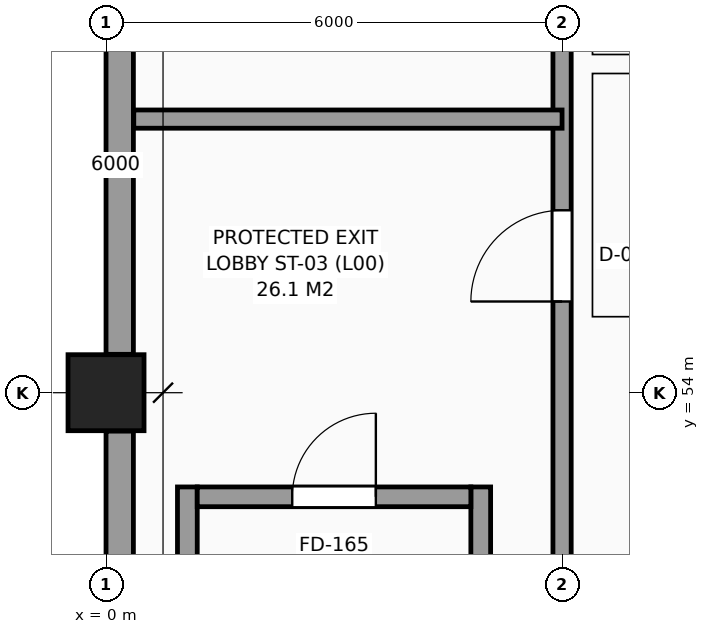
"""IFC4 building model, lengths in metres.
Left out: names, types, materials, properties, quantities, classifications, styles, units other than length and angle.
Written with IfcOpenShell. Run it as: python <this file> out.ifc"""

import sys

from ifc_helpers import new_model, si_unit, direction, frame, frame_2d, origin, origin_2d, place, context, subcontext, project, spatial, rectangle, extrude, element, fill, save


model = new_model("IFC4")
c1 = context("Model", 3, precision=1e-05, world=origin(), true_north=direction((0.0, 1.0)))
c2 = subcontext(c1, "Body", "Model", "MODEL_VIEW")
j1 = project(units=[si_unit("LENGTHUNIT", "METRE"), si_unit("PLANEANGLEUNIT", "RADIAN")], contexts=[c1])
p1 = place(None, origin())
s1 = spatial("IfcSite", under=j1, at=p1, CompositionType="ELEMENT")
p2 = place(p1, origin())
s2 = spatial("IfcBuilding", under=s1, at=p2, CompositionType="ELEMENT")
p3 = place(p2, origin())
s3 = spatial("IfcBuildingStorey", under=s2, at=p3, CompositionType="ELEMENT", Elevation=0.0)
p4 = place(p3, frame((0.0, 54.0, 0.0), z_axis=(0.0, 0.0, 1.0), x_axis=(1.0, 0.0, 0.0)))
e1 = element("IfcColumn", 1, at=p4, inside=s3, PredefinedType="COLUMN", context=c2, shape_type="SweptSolid", body=[
    extrude(rectangle(XDim=1.0, YDim=1.0, at=origin_2d()), origin(), (0.0, 0.0, 1.0), 6.0),
])
for number, where, z_axis, x_axis in (
    (2, (0.18, 59.295, 0.0), (0.0, 0.0, 1.0), (0.0, -1.0, 0.0)),
    (3, (0.18, 53.495, 0.0), (0.0, 0.0, 1.0), (0.0, -1.0, 0.0)),
):
    element("IfcWall", number, at=place(p3, frame(where, z_axis=z_axis, x_axis=x_axis)), inside=s3, PredefinedType="SOLIDWALL", context=c2, shape_type="SweptSolid", body=[
        extrude(rectangle(XDim=4.79, YDim=0.36, at=frame_2d((2.395, 0.0))), origin(), (0.0, 0.0, 1.0), 4.99),
    ])
for number, where, z_axis, x_axis in (
    (4, (1.07, 42.04, 0.0), (0.0, 0.0, 1.0), (0.0, 1.0, 0.0)),
    (5, (4.93, 42.04, 0.0), (0.0, 0.0, 1.0), (0.0, 1.0, 0.0)),
):
    element("IfcWall", number, at=place(p3, frame(where, z_axis=z_axis, x_axis=x_axis)), inside=s3, PredefinedType="SHEAR", context=c2, shape_type="SweptSolid", body=[
        extrude(rectangle(XDim=10.72, YDim=0.26, at=frame_2d((5.36, 0.0))), origin(), (0.0, 0.0, 1.0), 6.0),
    ])
p5 = place(p3, frame((1.2, 52.63, 0.0), z_axis=(0.0, 0.0, 1.0), x_axis=(1.0, 0.0, 0.0)))
e6 = element("IfcWall", 6, at=p5, inside=s3, PredefinedType="SHEAR", context=c2, shape_type="SweptSolid", body=[
    extrude(rectangle(XDim=3.6, YDim=0.26, at=frame_2d((1.8, 0.0))), origin(), (0.0, 0.0, 1.0), 6.0),
])
p6 = place(p5, frame((1.25, 0.0, 0.0)))
e7 = element("IfcOpeningElement", 7, at=p6, cuts=e6, PredefinedType="OPENING", context=c2, shape_type="SweptSolid", body=[
    extrude(rectangle(XDim=1.1, YDim=2.15, at=frame_2d((0.55, 1.075))), frame((0.0, 0.14, 0.0), z_axis=(0.0, -1.0, 0.0), x_axis=(1.0, 0.0, 0.0)), (0.0, 0.0, 1.0), 0.28),
])
p7 = place(p3, frame((6.0, 42.705, 0.0), z_axis=(0.0, 0.0, 1.0), x_axis=(0.0, 1.0, 0.0)))
e8 = element("IfcWall", 8, at=p7, inside=s3, PredefinedType="PARTITIONING", context=c2, shape_type="SweptSolid", body=[
    extrude(rectangle(XDim=40.79, YDim=0.24, at=frame_2d((20.395, 0.0))), origin(), (0.0, 0.0, 1.0), 5.74),
])
p8 = place(p7, frame((12.495, 0.0, 0.0)))
e9 = element("IfcOpeningElement", 9, at=p8, cuts=e8, PredefinedType="OPENING", context=c2, shape_type="SweptSolid", body=[
    extrude(rectangle(XDim=1.2, YDim=2.2, at=frame_2d((0.6, 1.1))), frame((0.0, 0.13, 0.0), z_axis=(0.0, -1.0, 0.0), x_axis=(1.0, 0.0, 0.0)), (0.0, 0.0, 1.0), 0.26),
])
p9 = place(p7, frame((25.745, 0.0, 0.0)))
e10 = element("IfcOpeningElement", 10, at=p9, cuts=e8, PredefinedType="OPENING", context=c2, shape_type="SweptSolid", body=[
    extrude(rectangle(XDim=1.1, YDim=2.15, at=frame_2d((0.55, 1.075))), frame((0.0, 0.13, 0.0), z_axis=(0.0, -1.0, 0.0), x_axis=(1.0, 0.0, 0.0)), (0.0, 0.0, 1.0), 0.26),
])
p10 = place(p3, frame((0.365, 57.6, 0.0), z_axis=(0.0, 0.0, 1.0), x_axis=(1.0, 0.0, 0.0)))
e11 = element("IfcWall", 11, at=p10, inside=s3, PredefinedType="PARTITIONING", context=c2, shape_type="SweptSolid", body=[
    extrude(rectangle(XDim=5.635, YDim=0.24, at=frame_2d((2.817, 0.0))), origin(), (0.0, 0.0, 1.0), 5.74),
])
p11 = place(p6, origin())
e12 = element("IfcDoor", 12, at=p11, inside=s3, OperationType="SINGLE_SWING_RIGHT", PredefinedType="DOOR", context=c2, shape_type="SweptSolid", body=[
    extrude(rectangle(XDim=1.1, YDim=2.15, at=frame_2d((0.55, 1.075))), frame((0.0, 0.025, 0.0), z_axis=(0.0, -1.0, 0.0), x_axis=(1.0, 0.0, 0.0)), (0.0, 0.0, 1.0), 0.05),
])
fill(e7, e12)
p12 = place(p8, origin())
e13 = element("IfcDoor", 13, at=p12, inside=s3, OperationType="SINGLE_SWING_LEFT", PredefinedType="DOOR", context=c2, shape_type="SweptSolid", body=[
    extrude(rectangle(XDim=1.2, YDim=2.2, at=frame_2d((0.6, 1.1))), frame((0.0, 0.025, 0.0), z_axis=(0.0, -1.0, 0.0), x_axis=(1.0, 0.0, 0.0)), (0.0, 0.0, 1.0), 0.05),
])
fill(e9, e13)
save(model, sys.argv[1])
